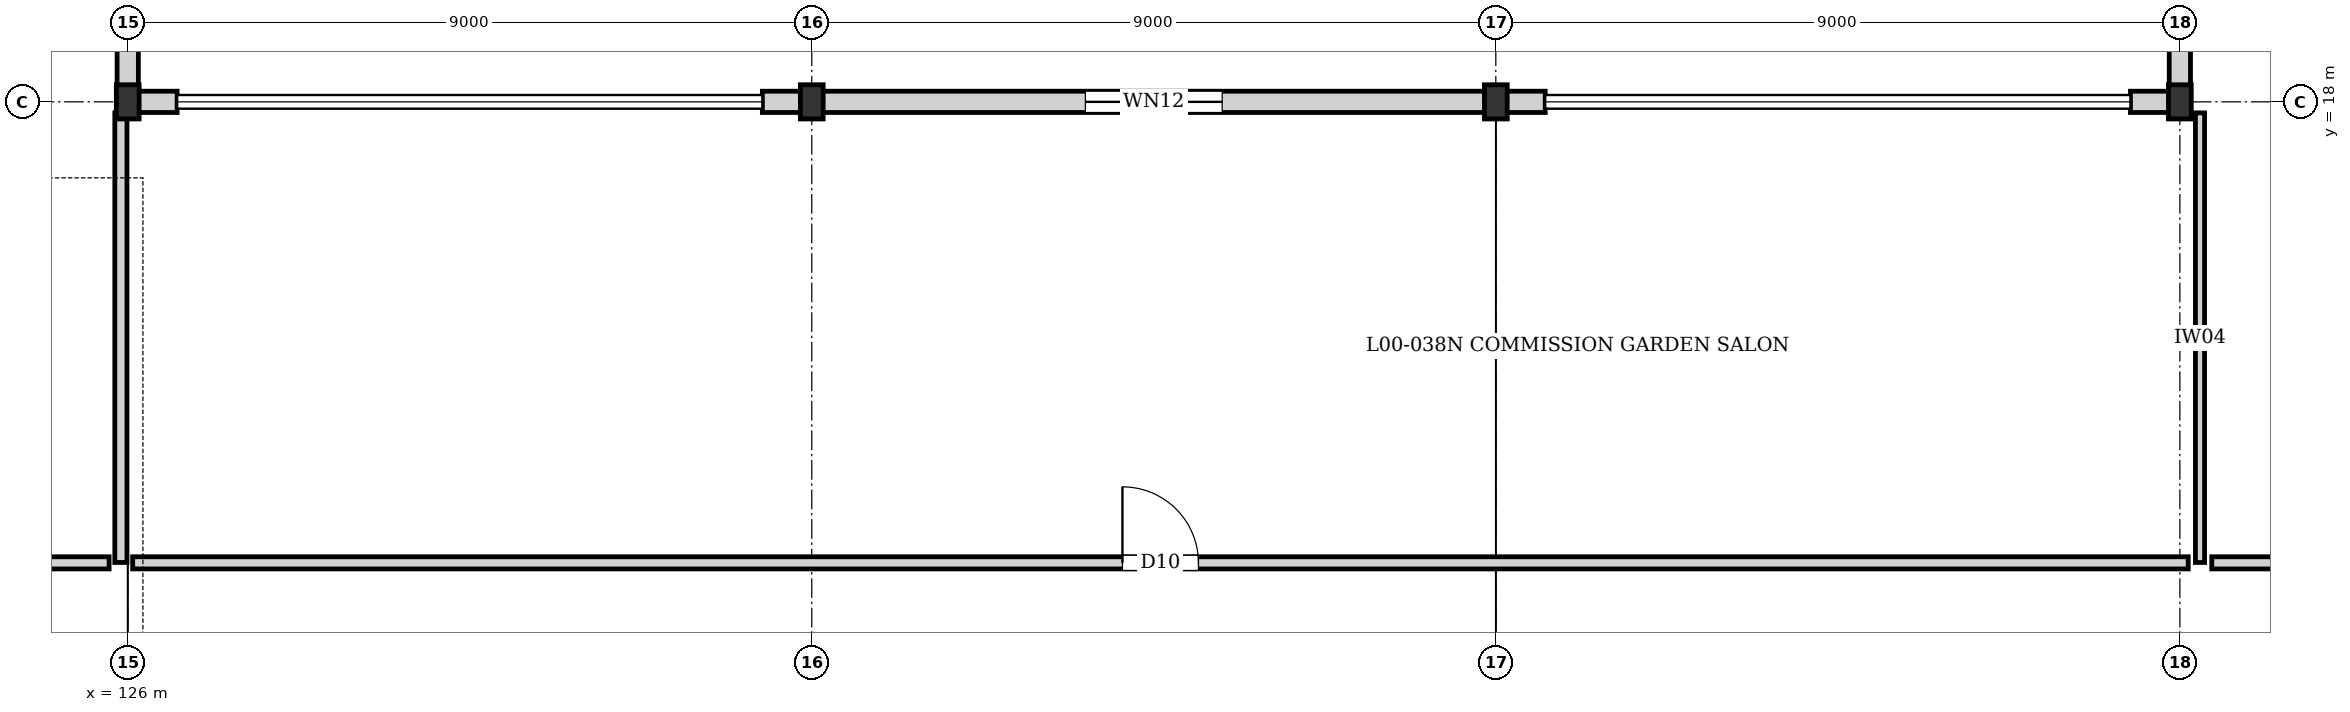
"""IFC4 building model, lengths in metres.
Left out: names, types, materials, properties, quantities, classifications, styles, units other than length and angle.
Written with IfcOpenShell. Run it as: python <this file> out.ifc"""

import sys

from ifc_helpers import new_model, si_unit, direction, frame, frame_2d, origin, origin_2d, place, context, subcontext, project, spatial, rectangle, i_section, extrude, element, fill, save


model = new_model("IFC4")
c1 = context("Model", 3, precision=1e-05, world=origin(), true_north=direction((0.0, 1.0)))
c2 = subcontext(c1, "Body", "Model", "MODEL_VIEW")
j1 = project(units=[si_unit("LENGTHUNIT", "METRE"), si_unit("PLANEANGLEUNIT", "RADIAN")], contexts=[c1])
p1 = place(None, origin())
s1 = spatial("IfcSite", under=j1, at=p1, CompositionType="ELEMENT")
p2 = place(p1, origin())
s2 = spatial("IfcBuilding", under=s1, at=p2, CompositionType="ELEMENT")
p3 = place(p2, origin())
s3 = spatial("IfcBuildingStorey", under=s2, at=p3, CompositionType="ELEMENT", Elevation=0.0)
for number, where, z_axis, x_axis in (
    (1, (126.0, 18.0, 0.0), (0.0, 0.0, 1.0), (1.0, 0.0, 0.0)),
    (2, (135.0, 18.0, 0.0), (0.0, 0.0, 1.0), (1.0, 0.0, 0.0)),
    (3, (144.0, 18.0, 0.0), (0.0, 0.0, 1.0), (1.0, 0.0, 0.0)),
    (4, (153.0, 18.0, 0.0), (0.0, 0.0, 1.0), (1.0, 0.0, 0.0)),
):
    element("IfcColumn", number, at=place(p3, frame(where, z_axis=z_axis, x_axis=x_axis)), inside=s3, PredefinedType="COLUMN", context=c2, shape_type="SweptSolid", body=[
        extrude(i_section(OverallWidth=0.3, OverallDepth=0.45, WebThickness=0.014, FlangeThickness=0.026, at=origin_2d()), origin(), (0.0, 0.0, 1.0), 4.32),
    ])
p4 = place(p3, frame((153.0, 18.155, 0.0), z_axis=(0.0, 0.0, 1.0), x_axis=(0.0, 1.0, 0.0)))
e5 = element("IfcWall", 5, at=p4, inside=s3, PredefinedType="SOLIDWALL", context=c2, shape_type="SweptSolid", body=[
    extrude(rectangle(XDim=8.845, YDim=0.28, at=frame_2d((4.422, 0.0))), origin(), (0.0, 0.0, 1.0), 3.765),
])
p5 = place(p4, frame((3.145, 0.0, 0.4)))
e6 = element("IfcOpeningElement", 6, at=p5, cuts=e5, PredefinedType="OPENING", context=c2, shape_type="SweptSolid", body=[
    extrude(rectangle(XDim=2.4, YDim=1.95, at=frame_2d((1.2, 0.975))), frame((0.0, 0.15, 0.0), z_axis=(0.0, -1.0, 0.0), x_axis=(1.0, 0.0, 0.0)), (0.0, 0.0, 1.0), 0.3),
])
p6 = place(p3, frame((126.0, 27.0, 0.0), z_axis=(0.0, 0.0, 1.0), x_axis=(0.0, -1.0, 0.0)))
e7 = element("IfcWall", 7, at=p6, inside=s3, PredefinedType="SOLIDWALL", context=c2, shape_type="SweptSolid", body=[
    extrude(rectangle(XDim=8.845, YDim=0.28, at=frame_2d((4.422, 0.0))), origin(), (0.0, 0.0, 1.0), 3.565),
])
p7 = place(p6, frame((3.0, 0.0, 0.4)))
e8 = element("IfcOpeningElement", 8, at=p7, cuts=e7, PredefinedType="OPENING", context=c2, shape_type="SweptSolid", body=[
    extrude(rectangle(XDim=3.0, YDim=2.6, at=frame_2d((1.5, 1.3))), frame((0.0, 0.15, 0.0), z_axis=(0.0, -1.0, 0.0), x_axis=(1.0, 0.0, 0.0)), (0.0, 0.0, 1.0), 0.3),
])
for number, where, z_axis, x_axis in (
    (9, (126.0, 18.0, 0.0), (0.0, 0.0, 1.0), (1.0, 0.0, 0.0)),
    (10, (134.35, 18.0, 0.0), (0.0, 0.0, 1.0), (1.0, 0.0, 0.0)),
):
    element("IfcWall", number, at=place(p3, frame(where, z_axis=z_axis, x_axis=x_axis)), inside=s3, PredefinedType="SOLIDWALL", context=c2, shape_type="SweptSolid", body=[
        extrude(rectangle(XDim=0.65, YDim=0.28, at=frame_2d((0.325, 0.0))), origin(), (0.0, 0.0, 1.0), 3.825),
    ])
p8 = place(p3, frame((135.0, 18.0, 0.0), z_axis=(0.0, 0.0, 1.0), x_axis=(1.0, 0.0, 0.0)))
e11 = element("IfcWall", 11, at=p8, inside=s3, PredefinedType="SOLIDWALL", context=c2, shape_type="SweptSolid", body=[
    extrude(rectangle(XDim=9.0, YDim=0.28, at=frame_2d((4.5, 0.0))), origin(), (0.0, 0.0, 1.0), 3.755),
])
p9 = place(p8, frame((3.6, 0.0, 0.4)))
e12 = element("IfcOpeningElement", 12, at=p9, cuts=e11, PredefinedType="OPENING", context=c2, shape_type="SweptSolid", body=[
    extrude(rectangle(XDim=1.8, YDim=2.3, at=frame_2d((0.9, 1.15))), frame((0.0, 0.15, 0.0), z_axis=(0.0, -1.0, 0.0), x_axis=(1.0, 0.0, 0.0)), (0.0, 0.0, 1.0), 0.3),
])
for number, where, z_axis, x_axis in (
    (13, (144.0, 18.0, 0.0), (0.0, 0.0, 1.0), (1.0, 0.0, 0.0)),
    (14, (152.35, 18.0, 0.0), (0.0, 0.0, 1.0), (1.0, 0.0, 0.0)),
):
    element("IfcWall", number, at=place(p3, frame(where, z_axis=z_axis, x_axis=x_axis)), inside=s3, PredefinedType="SOLIDWALL", context=c2, shape_type="SweptSolid", body=[
        extrude(rectangle(XDim=0.65, YDim=0.28, at=frame_2d((0.325, 0.0))), origin(), (0.0, 0.0, 1.0), 3.695),
    ])
p10 = place(p3, frame((153.265, 11.94, 0.0), z_axis=(0.0, 0.0, 1.0), x_axis=(0.0, 1.0, 0.0)))
e15 = element("IfcWall", 15, at=p10, inside=s3, PredefinedType="PARTITIONING", context=c2, shape_type="SweptSolid", body=[
    extrude(rectangle(XDim=5.915, YDim=0.12, at=frame_2d((2.958, 0.0))), origin(), (0.0, 0.0, 1.0), 4.055),
])
p11 = place(p3, frame((125.91, 11.94, 0.0), z_axis=(0.0, 0.0, 1.0), x_axis=(0.0, 1.0, 0.0)))
e16 = element("IfcWall", 16, at=p11, inside=s3, PredefinedType="PARTITIONING", context=c2, shape_type="SweptSolid", body=[
    extrude(rectangle(XDim=5.915, YDim=0.16, at=frame_2d((2.958, 0.0))), origin(), (0.0, 0.0, 1.0), 3.615),
])
p12 = place(p3, frame((153.42, 11.935, 0.0), z_axis=(0.0, 0.0, 1.0), x_axis=(1.0, 0.0, 0.0)))
e17 = element("IfcWall", 17, at=p12, inside=s3, PredefinedType="PARTITIONING", context=c2, shape_type="SweptSolid", body=[
    extrude(rectangle(XDim=2.71, YDim=0.16, at=frame_2d((1.355, 0.0))), origin(), (0.0, 0.0, 1.0), 4.055),
])
p13 = place(p12, frame((0.93, 0.0, 0.0)))
e18 = element("IfcOpeningElement", 18, at=p13, cuts=e17, PredefinedType="OPENING", context=c2, shape_type="SweptSolid", body=[
    extrude(rectangle(XDim=1.5, YDim=2.1, at=frame_2d((0.75, 1.05))), frame((0.0, 0.09, 0.0), z_axis=(0.0, -1.0, 0.0), x_axis=(1.0, 0.0, 0.0)), (0.0, 0.0, 1.0), 0.18),
])
p14 = place(p3, frame((126.065, 11.935, 0.0), z_axis=(0.0, 0.0, 1.0), x_axis=(1.0, 0.0, 0.0)))
e19 = element("IfcWall", 19, at=p14, inside=s3, PredefinedType="PARTITIONING", context=c2, shape_type="SweptSolid", body=[
    extrude(rectangle(XDim=27.045, YDim=0.16, at=frame_2d((13.522, 0.0))), origin(), (0.0, 0.0, 1.0), 4.055),
])
p15 = place(p14, frame((13.022, 0.0, 0.0)))
e20 = element("IfcOpeningElement", 20, at=p15, cuts=e19, PredefinedType="OPENING", context=c2, shape_type="SweptSolid", body=[
    extrude(rectangle(XDim=1.0, YDim=2.1, at=frame_2d((0.5, 1.05))), frame((0.0, 0.09, 0.0), z_axis=(0.0, -1.0, 0.0), x_axis=(1.0, 0.0, 0.0)), (0.0, 0.0, 1.0), 0.18),
])
p16 = place(p3, frame((122.065, 11.935, 0.0), z_axis=(0.0, 0.0, 1.0), x_axis=(1.0, 0.0, 0.0)))
e21 = element("IfcWall", 21, at=p16, inside=s3, PredefinedType="PARTITIONING", context=c2, shape_type="SweptSolid", body=[
    extrude(rectangle(XDim=3.69, YDim=0.16, at=frame_2d((1.845, 0.0))), origin(), (0.0, 0.0, 1.0), 4.055),
])
p17 = place(p16, frame((0.54, 0.0, 0.0)))
e22 = element("IfcOpeningElement", 22, at=p17, cuts=e21, PredefinedType="OPENING", context=c2, shape_type="SweptSolid", body=[
    extrude(rectangle(XDim=1.5, YDim=2.1, at=frame_2d((0.75, 1.05))), frame((0.0, 0.09, 0.0), z_axis=(0.0, -1.0, 0.0), x_axis=(1.0, 0.0, 0.0)), (0.0, 0.0, 1.0), 0.18),
])
p18 = place(p9, origin())
e23 = element("IfcWindow", 23, at=p18, inside=s3, PartitioningType="SINGLE_PANEL", PredefinedType="WINDOW", context=c2, shape_type="SweptSolid", body=[
    extrude(rectangle(XDim=1.8, YDim=2.3, at=frame_2d((0.9, 1.15))), frame((0.0, 0.03, 0.0), z_axis=(0.0, -1.0, 0.0), x_axis=(1.0, 0.0, 0.0)), (0.0, 0.0, 1.0), 0.06),
])
fill(e12, e23)
p19 = place(p15, origin())
e24 = element("IfcDoor", 24, at=p19, inside=s3, OperationType="SINGLE_SWING_LEFT", PredefinedType="DOOR", context=c2, shape_type="SweptSolid", body=[
    extrude(rectangle(XDim=1.0, YDim=2.1, at=frame_2d((0.5, 1.05))), frame((0.0, 0.025, 0.0), z_axis=(0.0, -1.0, 0.0), x_axis=(1.0, 0.0, 0.0)), (0.0, 0.0, 1.0), 0.05),
])
fill(e20, e24)
save(model, sys.argv[1])
